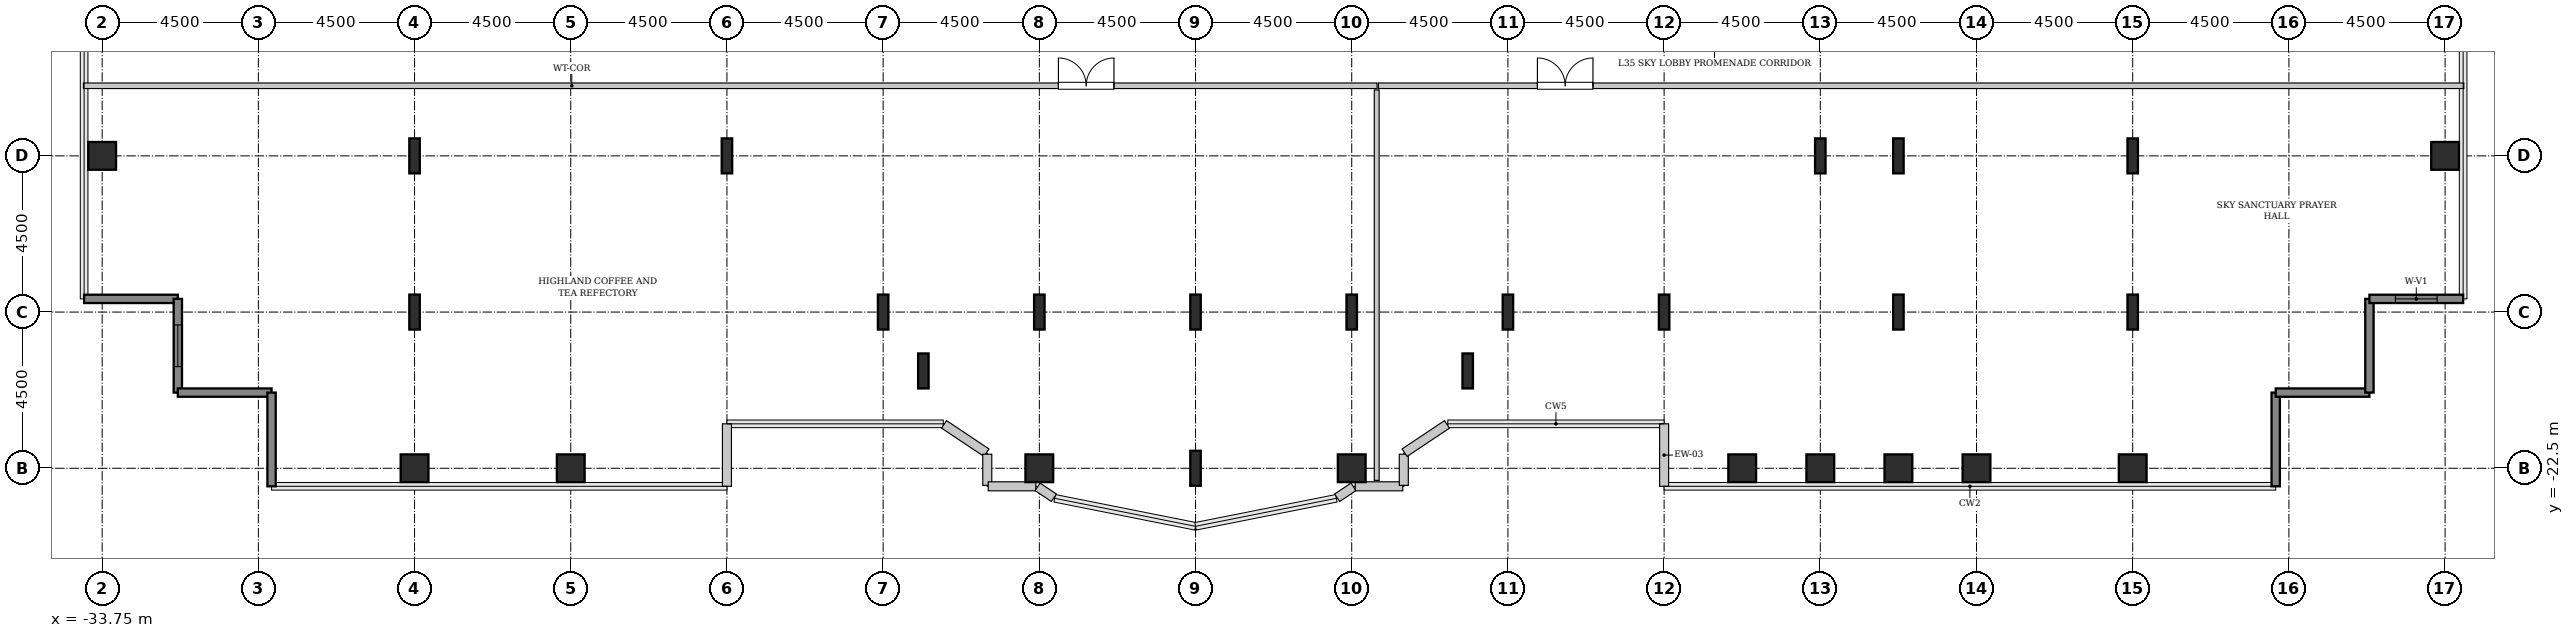
"""IFC4 building model, lengths in metres.
Left out: names, types, materials, properties, quantities, classifications, styles, units other than length and angle.
Written with IfcOpenShell. Run it as: python <this file> out.ifc"""

import sys

from ifc_helpers import new_model, si_unit, direction, frame, frame_2d, origin, origin_2d, place, context, subcontext, project, spatial, rectangle, hollow_rectangle, i_section, extrude, source, transform, mapped, element, fill, save


model = new_model("IFC4")
c1 = context("Model", 3, precision=1e-05, world=origin(), true_north=direction((0.0, 1.0)))
c2 = subcontext(c1, "Body", "Model", "MODEL_VIEW")
j1 = project(units=[si_unit("LENGTHUNIT", "METRE"), si_unit("PLANEANGLEUNIT", "RADIAN")], contexts=[c1])
p1 = place(None, origin())
s1 = spatial("IfcSite", under=j1, at=p1, CompositionType="ELEMENT")
p2 = place(p1, origin())
s2 = spatial("IfcBuilding", under=s1, at=p2, CompositionType="ELEMENT")
p3 = place(p2, frame((0.0, 0.0, 144.0)))
s3 = spatial("IfcBuildingStorey", under=s2, at=p3, CompositionType="ELEMENT", Elevation=144.0)
m1 = source(origin(), c2, "Body", "SweptSolid", [
    extrude(hollow_rectangle(XDim=0.8, YDim=0.8, WallThickness=0.04, InnerFilletRadius=0.04, OuterFilletRadius=0.08, at=origin_2d()), origin(), (0.0, 0.0, 1.0), 4.8),
])
for number, where, z_axis, x_axis in (
    (1, (-33.75, -13.5, 0.0), (0.0, 0.0, 1.0), (1.0, 0.0, 0.0)),
    (2, (-24.75, -22.5, 0.0), (0.0, 0.0, 1.0), (1.0, 0.0, 0.0)),
):
    element("IfcColumn", number, at=place(p3, frame(where, z_axis=z_axis, x_axis=x_axis)), inside=s3, PredefinedType="COLUMN", context=c2, shape_type="MappedRepresentation", body=[
        mapped(m1, transform((0.0, 0.0, 0.0), x_axis=(1.0, 0.0, 0.0), y_axis=(0.0, 1.0, 0.0), z_axis=(0.0, 0.0, 1.0), scale=1.0)),
    ])
m2 = source(origin(), c2, "Body", "SweptSolid", [
    extrude(i_section(OverallWidth=0.302, OverallDepth=1.008, WebThickness=0.021, FlangeThickness=0.04, FilletRadius=0.03, at=origin_2d()), origin(), (0.0, 0.0, 1.0), 4.8),
])
for number, where, z_axis, x_axis in (
    (3, (-24.75, -18.0, 0.0), (0.0, 0.0, 1.0), (1.0, 0.0, 0.0)),
    (4, (-24.75, -13.5, 0.0), (0.0, 0.0, 1.0), (1.0, 0.0, 0.0)),
):
    element("IfcColumn", number, at=place(p3, frame(where, z_axis=z_axis, x_axis=x_axis)), inside=s3, PredefinedType="COLUMN", context=c2, shape_type="MappedRepresentation", body=[
        mapped(m2, transform((0.0, 0.0, 0.0), x_axis=(1.0, 0.0, 0.0), y_axis=(0.0, 1.0, 0.0), z_axis=(0.0, 0.0, 1.0), scale=1.0)),
    ])
p4 = place(p3, frame((-20.25, -22.5, 0.0), z_axis=(0.0, 0.0, 1.0), x_axis=(1.0, 0.0, 0.0)))
e5 = element("IfcColumn", 5, at=p4, inside=s3, PredefinedType="COLUMN", context=c2, shape_type="MappedRepresentation", body=[
    mapped(m1, transform((0.0, 0.0, 0.0), x_axis=(1.0, 0.0, 0.0), y_axis=(0.0, 1.0, 0.0), z_axis=(0.0, 0.0, 1.0), scale=1.0)),
])
for number, where, z_axis, x_axis in (
    (6, (-15.75, -13.5, 0.0), (0.0, 0.0, 1.0), (1.0, 0.0, 0.0)),
    (7, (-11.25, -18.0, 0.0), (0.0, 0.0, 1.0), (1.0, 0.0, 0.0)),
    (8, (-10.091, -19.696, 0.0), (0.0, 0.0, 1.0), (1.0, 0.0, 0.0)),
):
    element("IfcColumn", number, at=place(p3, frame(where, z_axis=z_axis, x_axis=x_axis)), inside=s3, PredefinedType="COLUMN", context=c2, shape_type="MappedRepresentation", body=[
        mapped(m2, transform((0.0, 0.0, 0.0), x_axis=(1.0, 0.0, 0.0), y_axis=(0.0, 1.0, 0.0), z_axis=(0.0, 0.0, 1.0), scale=1.0)),
    ])
p5 = place(p3, frame((-6.75, -22.5, 0.0), z_axis=(0.0, 0.0, 1.0), x_axis=(1.0, 0.0, 0.0)))
e9 = element("IfcColumn", 9, at=p5, inside=s3, PredefinedType="COLUMN", context=c2, shape_type="MappedRepresentation", body=[
    mapped(m1, transform((0.0, 0.0, 0.0), x_axis=(1.0, 0.0, 0.0), y_axis=(0.0, 1.0, 0.0), z_axis=(0.0, 0.0, 1.0), scale=1.0)),
])
for number, where, z_axis, x_axis in (
    (10, (-6.75, -18.0, 0.0), (0.0, 0.0, 1.0), (1.0, 0.0, 0.0)),
    (11, (-2.25, -22.5, 0.0), (0.0, 0.0, 1.0), (1.0, 0.0, 0.0)),
    (12, (-2.25, -18.0, 0.0), (0.0, 0.0, 1.0), (1.0, 0.0, 0.0)),
):
    element("IfcColumn", number, at=place(p3, frame(where, z_axis=z_axis, x_axis=x_axis)), inside=s3, PredefinedType="COLUMN", context=c2, shape_type="MappedRepresentation", body=[
        mapped(m2, transform((0.0, 0.0, 0.0), x_axis=(1.0, 0.0, 0.0), y_axis=(0.0, 1.0, 0.0), z_axis=(0.0, 0.0, 1.0), scale=1.0)),
    ])
p6 = place(p3, frame((2.25, -22.5, 0.0), z_axis=(0.0, 0.0, 1.0), x_axis=(1.0, 0.0, 0.0)))
e13 = element("IfcColumn", 13, at=p6, inside=s3, PredefinedType="COLUMN", context=c2, shape_type="MappedRepresentation", body=[
    mapped(m1, transform((0.0, 0.0, 0.0), x_axis=(1.0, 0.0, 0.0), y_axis=(0.0, 1.0, 0.0), z_axis=(0.0, 0.0, 1.0), scale=1.0)),
])
for number, where, z_axis, x_axis in (
    (14, (2.25, -18.0, 0.0), (0.0, 0.0, 1.0), (1.0, 0.0, 0.0)),
    (15, (5.591, -19.696, 0.0), (0.0, 0.0, 1.0), (1.0, 0.0, 0.0)),
    (16, (6.75, -18.0, 0.0), (0.0, 0.0, 1.0), (1.0, 0.0, 0.0)),
    (17, (11.25, -18.0, 0.0), (0.0, 0.0, 1.0), (1.0, 0.0, 0.0)),
):
    element("IfcColumn", number, at=place(p3, frame(where, z_axis=z_axis, x_axis=x_axis)), inside=s3, PredefinedType="COLUMN", context=c2, shape_type="MappedRepresentation", body=[
        mapped(m2, transform((0.0, 0.0, 0.0), x_axis=(1.0, 0.0, 0.0), y_axis=(0.0, 1.0, 0.0), z_axis=(0.0, 0.0, 1.0), scale=1.0)),
    ])
for number, where, z_axis, x_axis in (
    (18, (13.5, -22.5, 0.0), (0.0, 0.0, 1.0), (1.0, 0.0, 0.0)),
    (19, (15.75, -22.5, 0.0), (0.0, 0.0, 1.0), (1.0, 0.0, 0.0)),
):
    element("IfcColumn", number, at=place(p3, frame(where, z_axis=z_axis, x_axis=x_axis)), inside=s3, PredefinedType="COLUMN", context=c2, shape_type="MappedRepresentation", body=[
        mapped(m1, transform((0.0, 0.0, 0.0), x_axis=(1.0, 0.0, 0.0), y_axis=(0.0, 1.0, 0.0), z_axis=(0.0, 0.0, 1.0), scale=1.0)),
    ])
p7 = place(p3, frame((15.75, -13.5, 0.0), z_axis=(0.0, 0.0, 1.0), x_axis=(1.0, 0.0, 0.0)))
e20 = element("IfcColumn", 20, at=p7, inside=s3, PredefinedType="COLUMN", context=c2, shape_type="MappedRepresentation", body=[
    mapped(m2, transform((0.0, 0.0, 0.0), x_axis=(1.0, 0.0, 0.0), y_axis=(0.0, 1.0, 0.0), z_axis=(0.0, 0.0, 1.0), scale=1.0)),
])
p8 = place(p3, frame((18.0, -22.5, 0.0), z_axis=(0.0, 0.0, 1.0), x_axis=(1.0, 0.0, 0.0)))
e21 = element("IfcColumn", 21, at=p8, inside=s3, PredefinedType="COLUMN", context=c2, shape_type="MappedRepresentation", body=[
    mapped(m1, transform((0.0, 0.0, 0.0), x_axis=(1.0, 0.0, 0.0), y_axis=(0.0, 1.0, 0.0), z_axis=(0.0, 0.0, 1.0), scale=1.0)),
])
for number, where, z_axis, x_axis in (
    (22, (18.0, -18.0, 0.0), (0.0, 0.0, 1.0), (1.0, 0.0, 0.0)),
    (23, (18.0, -13.5, 0.0), (0.0, 0.0, 1.0), (1.0, 0.0, 0.0)),
):
    element("IfcColumn", number, at=place(p3, frame(where, z_axis=z_axis, x_axis=x_axis)), inside=s3, PredefinedType="COLUMN", context=c2, shape_type="MappedRepresentation", body=[
        mapped(m2, transform((0.0, 0.0, 0.0), x_axis=(1.0, 0.0, 0.0), y_axis=(0.0, 1.0, 0.0), z_axis=(0.0, 0.0, 1.0), scale=1.0)),
    ])
for number, where, z_axis, x_axis in (
    (24, (20.25, -22.5, 0.0), (0.0, 0.0, 1.0), (1.0, 0.0, 0.0)),
    (25, (24.75, -22.5, 0.0), (0.0, 0.0, 1.0), (1.0, 0.0, 0.0)),
):
    element("IfcColumn", number, at=place(p3, frame(where, z_axis=z_axis, x_axis=x_axis)), inside=s3, PredefinedType="COLUMN", context=c2, shape_type="MappedRepresentation", body=[
        mapped(m1, transform((0.0, 0.0, 0.0), x_axis=(1.0, 0.0, 0.0), y_axis=(0.0, 1.0, 0.0), z_axis=(0.0, 0.0, 1.0), scale=1.0)),
    ])
for number, where, z_axis, x_axis in (
    (26, (24.75, -18.0, 0.0), (0.0, 0.0, 1.0), (1.0, 0.0, 0.0)),
    (27, (24.75, -13.5, 0.0), (0.0, 0.0, 1.0), (1.0, 0.0, 0.0)),
):
    element("IfcColumn", number, at=place(p3, frame(where, z_axis=z_axis, x_axis=x_axis)), inside=s3, PredefinedType="COLUMN", context=c2, shape_type="MappedRepresentation", body=[
        mapped(m2, transform((0.0, 0.0, 0.0), x_axis=(1.0, 0.0, 0.0), y_axis=(0.0, 1.0, 0.0), z_axis=(0.0, 0.0, 1.0), scale=1.0)),
    ])
p9 = place(p3, frame((33.75, -13.5, 0.0), z_axis=(0.0, 0.0, 1.0), x_axis=(1.0, 0.0, 0.0)))
e28 = element("IfcColumn", 28, at=p9, inside=s3, PredefinedType="COLUMN", context=c2, shape_type="MappedRepresentation", body=[
    mapped(m1, transform((0.0, 0.0, 0.0), x_axis=(1.0, 0.0, 0.0), y_axis=(0.0, 1.0, 0.0), z_axis=(0.0, 0.0, 1.0), scale=1.0)),
])
m3 = source(origin(), c2, "Body", "SweptSolid", [
    extrude(rectangle(XDim=1.8, YDim=0.26, at=frame_2d((0.9, 0.0))), origin(), (0.0, 0.0, 1.0), 4.55),
])
p10 = place(p3, frame((11.25, -21.22, 0.0), z_axis=(0.0, 0.0, 1.0), x_axis=(0.0, -1.0, 0.0)))
e29 = element("IfcWall", 29, at=p10, inside=s3, PredefinedType="SOLIDWALL", context=c2, shape_type="MappedRepresentation", body=[
    mapped(m3, transform((0.0, 0.0, 0.0), x_axis=(1.0, 0.0, 0.0), y_axis=(0.0, 1.0, 0.0), z_axis=(0.0, 0.0, 1.0), scale=1.0)),
])
m4 = source(origin(), c2, "Body", "SweptSolid", [
    extrude(rectangle(XDim=2.7, YDim=0.24, at=frame_2d((1.35, 0.0))), origin(), (0.0, 0.0, 1.0), 4.55),
])
for number, where, z_axis, x_axis in (
    (30, (28.87, -23.02, 0.0), (0.0, 0.0, 1.0), (0.0, 1.0, 0.0)),
    (31, (28.87, -20.32, 0.0), (0.0, 0.0, 1.0), (1.0, 0.0, 0.0)),
    (32, (31.57, -20.32, 0.0), (0.0, 0.0, 1.0), (0.0, 1.0, 0.0)),
):
    element("IfcWall", number, at=place(p3, frame(where, z_axis=z_axis, x_axis=x_axis)), inside=s3, PredefinedType="SHEAR", context=c2, shape_type="MappedRepresentation", body=[
        mapped(m4, transform((0.0, 0.0, 0.0), x_axis=(1.0, 0.0, 0.0), y_axis=(0.0, 1.0, 0.0), z_axis=(0.0, 0.0, 1.0), scale=1.0)),
    ])
p11 = place(p3, frame((31.57, -17.62, 0.0), z_axis=(0.0, 0.0, 1.0), x_axis=(1.0, 0.0, 0.0)))
e33 = element("IfcWall", 33, at=p11, inside=s3, PredefinedType="SHEAR", context=c2, shape_type="MappedRepresentation", body=[
    mapped(m4, transform((0.0, 0.0, 0.0), x_axis=(1.0, 0.0, 0.0), y_axis=(0.0, 1.0, 0.0), z_axis=(0.0, 0.0, 1.0), scale=1.0)),
])
p12 = place(p11, frame((0.75, 0.0, 0.85)))
e34 = element("IfcOpeningElement", 34, at=p12, cuts=e33, PredefinedType="OPENING", context=c2, shape_type="SweptSolid", body=[
    extrude(rectangle(XDim=1.2, YDim=1.8, at=frame_2d((0.6, 0.9))), frame((0.0, 0.13, 0.0), z_axis=(0.0, -1.0, 0.0), x_axis=(1.0, 0.0, 0.0)), (0.0, 0.0, 1.0), 0.26),
])
p13 = place(p3, frame((-34.27, -17.62, 0.0), z_axis=(0.0, 0.0, 1.0), x_axis=(1.0, 0.0, 0.0)))
e35 = element("IfcWall", 35, at=p13, inside=s3, PredefinedType="SHEAR", context=c2, shape_type="MappedRepresentation", body=[
    mapped(m4, transform((0.0, 0.0, 0.0), x_axis=(1.0, 0.0, 0.0), y_axis=(0.0, 1.0, 0.0), z_axis=(0.0, 0.0, 1.0), scale=1.0)),
])
p14 = place(p3, frame((-31.57, -17.62, 0.0), z_axis=(0.0, 0.0, 1.0), x_axis=(0.0, -1.0, 0.0)))
e36 = element("IfcWall", 36, at=p14, inside=s3, PredefinedType="SHEAR", context=c2, shape_type="MappedRepresentation", body=[
    mapped(m4, transform((0.0, 0.0, 0.0), x_axis=(1.0, 0.0, 0.0), y_axis=(0.0, 1.0, 0.0), z_axis=(0.0, 0.0, 1.0), scale=1.0)),
])
p15 = place(p14, frame((0.75, 0.0, 0.85)))
e37 = element("IfcOpeningElement", 37, at=p15, cuts=e36, PredefinedType="OPENING", context=c2, shape_type="SweptSolid", body=[
    extrude(rectangle(XDim=1.2, YDim=1.8, at=frame_2d((0.6, 0.9))), frame((0.0, 0.13, 0.0), z_axis=(0.0, -1.0, 0.0), x_axis=(1.0, 0.0, 0.0)), (0.0, 0.0, 1.0), 0.26),
])
for number, where, z_axis, x_axis in (
    (38, (-31.57, -20.32, 0.0), (0.0, 0.0, 1.0), (1.0, 0.0, 0.0)),
    (39, (-28.87, -20.32, 0.0), (0.0, 0.0, 1.0), (0.0, -1.0, 0.0)),
):
    element("IfcWall", number, at=place(p3, frame(where, z_axis=z_axis, x_axis=x_axis)), inside=s3, PredefinedType="SHEAR", context=c2, shape_type="MappedRepresentation", body=[
        mapped(m4, transform((0.0, 0.0, 0.0), x_axis=(1.0, 0.0, 0.0), y_axis=(0.0, 1.0, 0.0), z_axis=(0.0, 0.0, 1.0), scale=1.0)),
    ])
p16 = place(p3, frame((-15.75, -23.02, 0.0), z_axis=(0.0, 0.0, 1.0), x_axis=(0.0, 1.0, 0.0)))
e40 = element("IfcWall", 40, at=p16, inside=s3, PredefinedType="SOLIDWALL", context=c2, shape_type="MappedRepresentation", body=[
    mapped(m3, transform((0.0, 0.0, 0.0), x_axis=(1.0, 0.0, 0.0), y_axis=(0.0, 1.0, 0.0), z_axis=(0.0, 0.0, 1.0), scale=1.0)),
])
m5 = source(origin(), c2, "Body", "SweptSolid", [
    extrude(rectangle(XDim=1.469, YDim=0.26, at=frame_2d((0.734, 0.0))), origin(), (0.0, 0.0, 1.0), 4.55),
])
p17 = place(p3, frame((-9.495, -21.236, 0.0), z_axis=(0.0, 0.0, 1.0), x_axis=(0.831461760506, -0.555581983884, 0.0)))
e41 = element("IfcWall", 41, at=p17, inside=s3, PredefinedType="SOLIDWALL", context=c2, shape_type="MappedRepresentation", body=[
    mapped(m5, transform((0.0, 0.0, 0.0), x_axis=(1.0, 0.0, 0.0), y_axis=(0.0, 1.0, 0.0), z_axis=(0.0, 0.0, 1.0), scale=1.0)),
])
m6 = source(origin(), c2, "Body", "SweptSolid", [
    extrude(rectangle(XDim=0.897, YDim=0.26, at=frame_2d((0.448, 0.0))), origin(), (0.0, 0.0, 1.0), 4.55),
])
p18 = place(p3, frame((-8.25, -22.095, 0.0), z_axis=(0.0, 0.0, 1.0), x_axis=(0.0, -1.0, 0.0)))
e42 = element("IfcWall", 42, at=p18, inside=s3, PredefinedType="SOLIDWALL", context=c2, shape_type="MappedRepresentation", body=[
    mapped(m6, transform((0.0, 0.0, 0.0), x_axis=(1.0, 0.0, 0.0), y_axis=(0.0, 1.0, 0.0), z_axis=(0.0, 0.0, 1.0), scale=1.0)),
])
m7 = source(origin(), c2, "Body", "SweptSolid", [
    extrude(rectangle(XDim=1.37, YDim=0.26, at=frame_2d((0.685, 0.0))), origin(), (0.0, 0.0, 1.0), 4.55),
])
p19 = place(p3, frame((-8.222, -23.02, 0.0), z_axis=(0.0, 0.0, 1.0), x_axis=(1.0, 0.0, 0.0)))
e43 = element("IfcWall", 43, at=p19, inside=s3, PredefinedType="SOLIDWALL", context=c2, shape_type="MappedRepresentation", body=[
    mapped(m7, transform((0.0, 0.0, 0.0), x_axis=(1.0, 0.0, 0.0), y_axis=(0.0, 1.0, 0.0), z_axis=(0.0, 0.0, 1.0), scale=1.0)),
])
m8 = source(origin(), c2, "Body", "SweptSolid", [
    extrude(rectangle(XDim=0.565, YDim=0.26, at=frame_2d((0.283, 0.0))), origin(), (0.0, 0.0, 1.0), 4.55),
])
for number, where, z_axis, x_axis in (
    (44, (-6.801, -23.036, 0.0), (0.0, 0.0, 1.0), (0.832, -0.555, 0.0)),
    (45, (1.831, -23.35, 0.0), (0.0, 0.0, 1.0), (0.832, 0.555, 0.0)),
):
    element("IfcWall", number, at=place(p3, frame(where, z_axis=z_axis, x_axis=x_axis)), inside=s3, PredefinedType="SOLIDWALL", context=c2, shape_type="MappedRepresentation", body=[
        mapped(m8, transform((0.0, 0.0, 0.0), x_axis=(1.0, 0.0, 0.0), y_axis=(0.0, 1.0, 0.0), z_axis=(0.0, 0.0, 1.0), scale=1.0)),
    ])
p20 = place(p3, frame((2.352, -23.02, 0.0), z_axis=(0.0, 0.0, 1.0), x_axis=(1.0, 0.0, 0.0)))
e46 = element("IfcWall", 46, at=p20, inside=s3, PredefinedType="SOLIDWALL", context=c2, shape_type="MappedRepresentation", body=[
    mapped(m7, transform((0.0, 0.0, 0.0), x_axis=(1.0, 0.0, 0.0), y_axis=(0.0, 1.0, 0.0), z_axis=(0.0, 0.0, 1.0), scale=1.0)),
])
p21 = place(p3, frame((3.75, -22.992, 0.0), z_axis=(0.0, 0.0, 1.0), x_axis=(0.0, 1.0, 0.0)))
e47 = element("IfcWall", 47, at=p21, inside=s3, PredefinedType="SOLIDWALL", context=c2, shape_type="MappedRepresentation", body=[
    mapped(m6, transform((0.0, 0.0, 0.0), x_axis=(1.0, 0.0, 0.0), y_axis=(0.0, 1.0, 0.0), z_axis=(0.0, 0.0, 1.0), scale=1.0)),
])
p22 = place(p3, frame((3.773, -22.052, 0.0), z_axis=(0.0, 0.0, 1.0), x_axis=(0.831461760506, 0.555581983884, 0.0)))
e48 = element("IfcWall", 48, at=p22, inside=s3, PredefinedType="SOLIDWALL", context=c2, shape_type="MappedRepresentation", body=[
    mapped(m5, transform((0.0, 0.0, 0.0), x_axis=(1.0, 0.0, 0.0), y_axis=(0.0, 1.0, 0.0), z_axis=(0.0, 0.0, 1.0), scale=1.0)),
])
m9 = source(origin(), c2, "Body", "SweptSolid", [
    extrude(rectangle(XDim=37.27, YDim=0.16, at=frame_2d((18.635, 0.0))), origin(), (0.0, 0.0, 1.0), 4.535),
])
p23 = place(p3, frame((-34.29, -11.48, 0.0), z_axis=(0.0, 0.0, 1.0), x_axis=(1.0, 0.0, 0.0)))
e49 = element("IfcWall", 49, at=p23, inside=s3, PredefinedType="PARTITIONING", context=c2, shape_type="MappedRepresentation", body=[
    mapped(m9, transform((0.0, 0.0, 0.0), x_axis=(1.0, 0.0, 0.0), y_axis=(0.0, 1.0, 0.0), z_axis=(0.0, 0.0, 1.0), scale=1.0)),
])
p24 = place(p23, frame((28.09, 0.0, 0.0)))
e50 = element("IfcOpeningElement", 50, at=p24, cuts=e49, PredefinedType="OPENING", context=c2, shape_type="SweptSolid", body=[
    extrude(rectangle(XDim=1.6, YDim=2.3, at=frame_2d((0.8, 1.15))), frame((0.0, 0.09, 0.0), z_axis=(0.0, -1.0, 0.0), x_axis=(1.0, 0.0, 0.0)), (0.0, 0.0, 1.0), 0.18),
])
m10 = source(origin(), c2, "Body", "SweptSolid", [
    extrude(rectangle(XDim=11.25, YDim=0.14, at=frame_2d((5.625, 0.0))), origin(), (0.0, 0.0, 1.0), 4.535),
])
p25 = place(p3, frame((2.97, -22.85, 0.0), z_axis=(0.0, 0.0, 1.0), x_axis=(0.0, 1.0, 0.0)))
e51 = element("IfcWall", 51, at=p25, inside=s3, PredefinedType="PARTITIONING", context=c2, shape_type="MappedRepresentation", body=[
    mapped(m10, transform((0.0, 0.0, 0.0), x_axis=(1.0, 0.0, 0.0), y_axis=(0.0, 1.0, 0.0), z_axis=(0.0, 0.0, 1.0), scale=1.0)),
])
m11 = source(origin(), c2, "Body", "SweptSolid", [
    extrude(rectangle(XDim=31.27, YDim=0.16, at=frame_2d((15.635, 0.0))), origin(), (0.0, 0.0, 1.0), 4.535),
])
p26 = place(p3, frame((3.02, -11.48, 0.0), z_axis=(0.0, 0.0, 1.0), x_axis=(1.0, 0.0, 0.0)))
e52 = element("IfcWall", 52, at=p26, inside=s3, PredefinedType="PARTITIONING", context=c2, shape_type="MappedRepresentation", body=[
    mapped(m11, transform((0.0, 0.0, 0.0), x_axis=(1.0, 0.0, 0.0), y_axis=(0.0, 1.0, 0.0), z_axis=(0.0, 0.0, 1.0), scale=1.0)),
])
p27 = place(p26, frame((4.58, 0.0, 0.0)))
e53 = element("IfcOpeningElement", 53, at=p27, cuts=e52, PredefinedType="OPENING", context=c2, shape_type="SweptSolid", body=[
    extrude(rectangle(XDim=1.6, YDim=2.3, at=frame_2d((0.8, 1.15))), frame((0.0, 0.09, 0.0), z_axis=(0.0, -1.0, 0.0), x_axis=(1.0, 0.0, 0.0)), (0.0, 0.0, 1.0), 0.18),
])
m12 = source(origin(), c2, "Body", "SweptSolid", [
    extrude(rectangle(XDim=1.2, YDim=1.8, at=frame_2d((0.6, 0.9))), frame((0.0, 0.03, 0.0), z_axis=(0.0, -1.0, 0.0), x_axis=(1.0, 0.0, 0.0)), (0.0, 0.0, 1.0), 0.06),
])
p28 = place(p12, origin())
e54 = element("IfcWindow", 54, at=p28, inside=s3, PartitioningType="SINGLE_PANEL", PredefinedType="WINDOW", context=c2, shape_type="MappedRepresentation", body=[
    mapped(m12, transform((0.0, 0.0, 0.0), x_axis=(1.0, 0.0, 0.0), y_axis=(0.0, 1.0, 0.0), z_axis=(0.0, 0.0, 1.0), scale=1.0)),
])
fill(e34, e54)
p29 = place(p15, origin())
e55 = element("IfcWindow", 55, at=p29, inside=s3, PartitioningType="SINGLE_PANEL", PredefinedType="WINDOW", context=c2, shape_type="MappedRepresentation", body=[
    mapped(m12, transform((0.0, 0.0, 0.0), x_axis=(1.0, 0.0, 0.0), y_axis=(0.0, 1.0, 0.0), z_axis=(0.0, 0.0, 1.0), scale=1.0)),
])
fill(e37, e55)
m13 = source(origin(), c2, "Body", "SweptSolid", [
    extrude(rectangle(XDim=1.6, YDim=2.3, at=frame_2d((0.8, 1.15))), frame((0.0, 0.025, 0.0), z_axis=(0.0, -1.0, 0.0), x_axis=(1.0, 0.0, 0.0)), (0.0, 0.0, 1.0), 0.05),
])
p30 = place(p24, origin())
e56 = element("IfcDoor", 56, at=p30, inside=s3, OperationType="DOUBLE_DOOR_SINGLE_SWING", PredefinedType="DOOR", context=c2, shape_type="MappedRepresentation", body=[
    mapped(m13, transform((0.0, 0.0, 0.0), x_axis=(1.0, 0.0, 0.0), y_axis=(0.0, 1.0, 0.0), z_axis=(0.0, 0.0, 1.0), scale=1.0)),
])
fill(e50, e56)
p31 = place(p27, origin())
e57 = element("IfcDoor", 57, at=p31, inside=s3, OperationType="DOUBLE_DOOR_SINGLE_SWING", PredefinedType="DOOR", context=c2, shape_type="MappedRepresentation", body=[
    mapped(m13, transform((0.0, 0.0, 0.0), x_axis=(1.0, 0.0, 0.0), y_axis=(0.0, 1.0, 0.0), z_axis=(0.0, 0.0, 1.0), scale=1.0)),
])
fill(e53, e57)
save(model, sys.argv[1])
